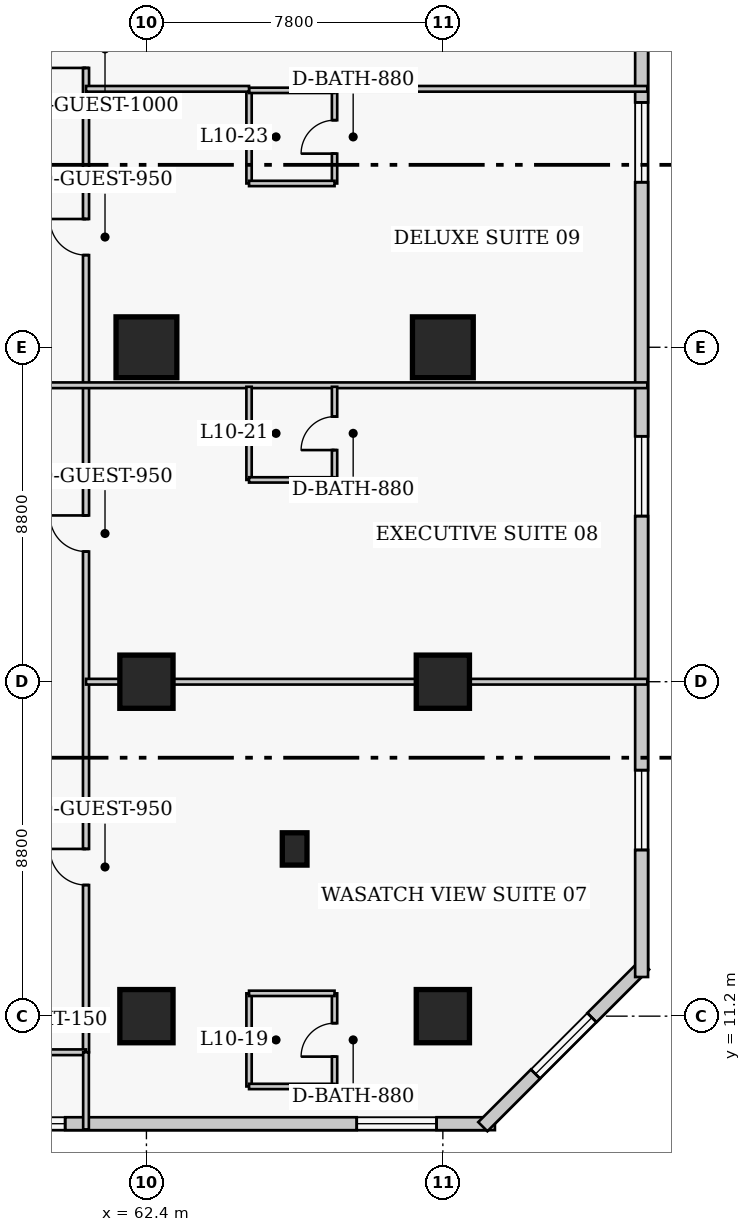
"""IFC4 building model, lengths in metres.
Left out: names, types, materials, properties, quantities, classifications, styles, units other than length and angle.
Written with IfcOpenShell. Run it as: python <this file> out.ifc"""

import sys

from ifc_helpers import new_model, si_unit, direction, frame, frame_2d, origin, origin_2d, place, context, subcontext, project, spatial, rectangle, extrude, element, fill, save


model = new_model("IFC4")
c1 = context("Model", 3, precision=1e-05, world=origin(), true_north=direction((0.0, 1.0)))
c2 = subcontext(c1, "Body", "Model", "MODEL_VIEW")
j1 = project(units=[si_unit("LENGTHUNIT", "METRE"), si_unit("PLANEANGLEUNIT", "RADIAN")], contexts=[c1])
p1 = place(None, origin())
s1 = spatial("IfcSite", under=j1, at=p1, CompositionType="ELEMENT")
p2 = place(p1, origin())
s2 = spatial("IfcBuilding", under=s1, at=p2, CompositionType="ELEMENT")
p3 = place(p2, frame((0.0, 0.0, 45.0)))
s3 = spatial("IfcBuildingStorey", under=s2, at=p3, CompositionType="ELEMENT", Elevation=45.0)
for number, where, z_axis, x_axis in (
    (1, (62.4, 11.2, 0.0), (0.0, 0.0, 1.0), (1.0, 0.0, 0.0)),
    (2, (62.4, 20.0, 0.0), (0.0, 0.0, 1.0), (1.0, 0.0, 0.0)),
):
    element("IfcColumn", number, at=place(p3, frame(where, z_axis=z_axis, x_axis=x_axis)), inside=s3, PredefinedType="COLUMN", context=c2, shape_type="SweptSolid", body=[
        extrude(rectangle(XDim=1.4, YDim=1.4, at=origin_2d()), origin(), (0.0, 0.0, 1.0), 3.8),
    ])
p4 = place(p3, frame((62.4, 28.8, 0.0), z_axis=(0.0, 0.0, 1.0), x_axis=(1.0, 0.0, 0.0)))
e3 = element("IfcColumn", 3, at=p4, inside=s3, PredefinedType="COLUMN", context=c2, shape_type="SweptSolid", body=[
    extrude(rectangle(XDim=1.6, YDim=1.6, at=origin_2d()), origin(), (0.0, 0.0, 1.0), 3.8),
])
for number, where, z_axis, x_axis in (
    (4, (70.2, 11.2, 0.0), (0.0, 0.0, 1.0), (1.0, 0.0, 0.0)),
    (5, (70.2, 20.0, 0.0), (0.0, 0.0, 1.0), (1.0, 0.0, 0.0)),
):
    element("IfcColumn", number, at=place(p3, frame(where, z_axis=z_axis, x_axis=x_axis)), inside=s3, PredefinedType="COLUMN", context=c2, shape_type="SweptSolid", body=[
        extrude(rectangle(XDim=1.4, YDim=1.4, at=origin_2d()), origin(), (0.0, 0.0, 1.0), 3.8),
    ])
p5 = place(p3, frame((70.2, 28.8, 0.0), z_axis=(0.0, 0.0, 1.0), x_axis=(1.0, 0.0, 0.0)))
e6 = element("IfcColumn", 6, at=p5, inside=s3, PredefinedType="COLUMN", context=c2, shape_type="SweptSolid", body=[
    extrude(rectangle(XDim=1.6, YDim=1.6, at=origin_2d()), origin(), (0.0, 0.0, 1.0), 3.8),
])
p6 = place(p3, frame((66.3, 15.6, 0.0), z_axis=(0.0, 0.0, 1.0), x_axis=(1.0, 0.0, 0.0)))
e7 = element("IfcColumn", 7, at=p6, inside=s3, PredefinedType="PILASTER", context=c2, shape_type="SweptSolid", body=[
    extrude(rectangle(XDim=0.65, YDim=0.85, at=origin_2d()), origin(), (0.0, 0.0, 1.0), 3.8),
])
p7 = place(p3, frame((41.68, 8.37, 0.0), z_axis=(0.0, 0.0, 1.0), x_axis=(1.0, 0.0, 0.0)))
e8 = element("IfcWall", 8, at=p7, inside=s3, PredefinedType="SOLIDWALL", context=c2, shape_type="SweptSolid", body=[
    extrude(rectangle(XDim=29.89, YDim=0.34, at=frame_2d((14.945, 0.0))), origin(), (0.0, 0.0, 1.0), 3.54),
])
p8 = place(p7, frame((2.036, 0.0, 0.85)))
e9 = element("IfcOpeningElement", 9, at=p8, cuts=e8, PredefinedType="OPENING", context=c2, shape_type="SweptSolid", body=[
    extrude(rectangle(XDim=2.1, YDim=1.85, at=frame_2d((1.05, 0.925))), frame((0.0, 0.18, 0.0), z_axis=(0.0, -1.0, 0.0), x_axis=(1.0, 0.0, 0.0)), (0.0, 0.0, 1.0), 0.36),
])
p9 = place(p7, frame((9.509, 0.0, 0.85)))
e10 = element("IfcOpeningElement", 10, at=p9, cuts=e8, PredefinedType="OPENING", context=c2, shape_type="SweptSolid", body=[
    extrude(rectangle(XDim=2.1, YDim=1.85, at=frame_2d((1.05, 0.925))), frame((0.0, 0.18, 0.0), z_axis=(0.0, -1.0, 0.0), x_axis=(1.0, 0.0, 0.0)), (0.0, 0.0, 1.0), 0.36),
])
p10 = place(p7, frame((16.481, 0.0, 0.85)))
e11 = element("IfcOpeningElement", 11, at=p10, cuts=e8, PredefinedType="OPENING", context=c2, shape_type="SweptSolid", body=[
    extrude(rectangle(XDim=2.1, YDim=1.85, at=frame_2d((1.05, 0.925))), frame((0.0, 0.18, 0.0), z_axis=(0.0, -1.0, 0.0), x_axis=(1.0, 0.0, 0.0)), (0.0, 0.0, 1.0), 0.36),
])
p11 = place(p7, frame((26.254, 0.0, 0.85)))
e12 = element("IfcOpeningElement", 12, at=p11, cuts=e8, PredefinedType="OPENING", context=c2, shape_type="SweptSolid", body=[
    extrude(rectangle(XDim=2.1, YDim=1.85, at=frame_2d((1.05, 0.925))), frame((0.0, 0.18, 0.0), z_axis=(0.0, -1.0, 0.0), x_axis=(1.0, 0.0, 0.0)), (0.0, 0.0, 1.0), 0.36),
])
p12 = place(p3, frame((71.251, 8.292, 0.0), z_axis=(0.0, 0.0, 1.0), x_axis=(0.707106781187, 0.707106781187, 0.0)))
e13 = element("IfcWall", 13, at=p12, inside=s3, PredefinedType="SOLIDWALL", context=c2, shape_type="SweptSolid", body=[
    extrude(rectangle(XDim=6.02, YDim=0.34, at=frame_2d((3.01, 0.0))), origin(), (0.0, 0.0, 1.0), 3.54),
])
p13 = place(p12, frame((1.96, 0.0, 0.85)))
e14 = element("IfcOpeningElement", 14, at=p13, cuts=e13, PredefinedType="OPENING", context=c2, shape_type="SweptSolid", body=[
    extrude(rectangle(XDim=2.1, YDim=1.85, at=frame_2d((1.05, 0.925))), frame((0.0, 0.18, 0.0), z_axis=(0.0, -1.0, 0.0), x_axis=(1.0, 0.0, 0.0)), (0.0, 0.0, 1.0), 0.36),
])
p14 = place(p3, frame((75.43, 12.23, 0.0), z_axis=(0.0, 0.0, 1.0), x_axis=(0.0, 1.0, 0.0)))
e15 = element("IfcWall", 15, at=p14, inside=s3, PredefinedType="SOLIDWALL", context=c2, shape_type="SweptSolid", body=[
    extrude(rectangle(XDim=35.14, YDim=0.34, at=frame_2d((17.57, 0.0))), origin(), (0.0, 0.0, 1.0), 3.54),
])
p15 = place(p14, frame((3.343, 0.0, 0.85)))
e16 = element("IfcOpeningElement", 16, at=p15, cuts=e15, PredefinedType="OPENING", context=c2, shape_type="SweptSolid", body=[
    extrude(rectangle(XDim=2.1, YDim=1.85, at=frame_2d((1.05, 0.925))), frame((0.0, 0.18, 0.0), z_axis=(0.0, -1.0, 0.0), x_axis=(1.0, 0.0, 0.0)), (0.0, 0.0, 1.0), 0.36),
])
p16 = place(p14, frame((12.127, 0.0, 0.85)))
e17 = element("IfcOpeningElement", 17, at=p16, cuts=e15, PredefinedType="OPENING", context=c2, shape_type="SweptSolid", body=[
    extrude(rectangle(XDim=2.1, YDim=1.85, at=frame_2d((1.05, 0.925))), frame((0.0, 0.18, 0.0), z_axis=(0.0, -1.0, 0.0), x_axis=(1.0, 0.0, 0.0)), (0.0, 0.0, 1.0), 0.36),
])
p17 = place(p14, frame((20.913, 0.0, 0.85)))
e18 = element("IfcOpeningElement", 18, at=p17, cuts=e15, PredefinedType="OPENING", context=c2, shape_type="SweptSolid", body=[
    extrude(rectangle(XDim=2.1, YDim=1.85, at=frame_2d((1.05, 0.925))), frame((0.0, 0.18, 0.0), z_axis=(0.0, -1.0, 0.0), x_axis=(1.0, 0.0, 0.0)), (0.0, 0.0, 1.0), 0.36),
])
p18 = place(p14, frame((29.698, 0.0, 0.85)))
e19 = element("IfcOpeningElement", 19, at=p18, cuts=e15, PredefinedType="OPENING", context=c2, shape_type="SweptSolid", body=[
    extrude(rectangle(XDim=2.1, YDim=1.85, at=frame_2d((1.05, 0.925))), frame((0.0, 0.18, 0.0), z_axis=(0.0, -1.0, 0.0), x_axis=(1.0, 0.0, 0.0)), (0.0, 0.0, 1.0), 0.36),
])
p19 = place(p3, frame((60.81, 10.25, 0.0), z_axis=(0.0, 0.0, 1.0), x_axis=(0.0, 1.0, 0.0)))
e20 = element("IfcWall", 20, at=p19, inside=s3, PredefinedType="PARTITIONING", context=c2, shape_type="SweptSolid", body=[
    extrude(rectangle(XDim=30.4, YDim=0.16, at=frame_2d((15.2, 0.0))), origin(), (0.0, 0.0, 1.0), 3.54),
])
p20 = place(p19, frame((4.4, 0.0, 0.0)))
e21 = element("IfcOpeningElement", 21, at=p20, cuts=e20, PredefinedType="OPENING", context=c2, shape_type="SweptSolid", body=[
    extrude(rectangle(XDim=0.95, YDim=2.1, at=frame_2d((0.475, 1.05))), frame((0.0, 0.09, 0.0), z_axis=(0.0, -1.0, 0.0), x_axis=(1.0, 0.0, 0.0)), (0.0, 0.0, 1.0), 0.18),
])
p21 = place(p19, frame((13.175, 0.0, 0.0)))
e22 = element("IfcOpeningElement", 22, at=p21, cuts=e20, PredefinedType="OPENING", context=c2, shape_type="SweptSolid", body=[
    extrude(rectangle(XDim=0.95, YDim=2.1, at=frame_2d((0.475, 1.05))), frame((0.0, 0.09, 0.0), z_axis=(0.0, -1.0, 0.0), x_axis=(1.0, 0.0, 0.0)), (0.0, 0.0, 1.0), 0.18),
])
p22 = place(p19, frame((20.975, 0.0, 0.0)))
e23 = element("IfcOpeningElement", 23, at=p22, cuts=e20, PredefinedType="OPENING", context=c2, shape_type="SweptSolid", body=[
    extrude(rectangle(XDim=0.95, YDim=2.1, at=frame_2d((0.475, 1.05))), frame((0.0, 0.09, 0.0), z_axis=(0.0, -1.0, 0.0), x_axis=(1.0, 0.0, 0.0)), (0.0, 0.0, 1.0), 0.18),
])
p23 = place(p19, frame((25.9, 0.0, 0.0)))
e24 = element("IfcOpeningElement", 24, at=p23, cuts=e20, PredefinedType="OPENING", context=c2, shape_type="SweptSolid", body=[
    extrude(rectangle(XDim=1.0, YDim=2.15, at=frame_2d((0.5, 1.075))), frame((0.0, 0.09, 0.0), z_axis=(0.0, -1.0, 0.0), x_axis=(1.0, 0.0, 0.0)), (0.0, 0.0, 1.0), 0.18),
])
p24 = place(p3, frame((58.59, 10.25, 0.0), z_axis=(0.0, 0.0, 1.0), x_axis=(1.0, 0.0, 0.0)))
e25 = element("IfcWall", 25, at=p24, inside=s3, PredefinedType="PARTITIONING", context=c2, shape_type="SweptSolid", body=[
    extrude(rectangle(XDim=2.22, YDim=0.15, at=frame_2d((1.11, 0.0))), origin(), (0.0, 0.0, 1.0), 3.54),
])
p25 = place(p3, frame((60.81, 8.22, 0.0), z_axis=(0.0, 0.0, 1.0), x_axis=(0.0, 1.0, 0.0)))
e26 = element("IfcWall", 26, at=p25, inside=s3, PredefinedType="PARTITIONING", context=c2, shape_type="SweptSolid", body=[
    extrude(rectangle(XDim=2.03, YDim=0.15, at=frame_2d((1.015, 0.0))), origin(), (0.0, 0.0, 1.0), 3.54),
])
p26 = place(p3, frame((65.1, 9.35, 0.0), z_axis=(0.0, 0.0, 1.0), x_axis=(0.0, 1.0, 0.0)))
e27 = element("IfcWall", 27, at=p26, inside=s3, PredefinedType="PLUMBINGWALL", context=c2, shape_type="SweptSolid", body=[
    extrude(rectangle(XDim=2.45, YDim=0.14, at=frame_2d((1.225, 0.0))), origin(), (0.0, 0.0, 1.0), 3.54),
])
p27 = place(p3, frame((67.35, 9.35, 0.0), z_axis=(0.0, 0.0, 1.0), x_axis=(0.0, 1.0, 0.0)))
e28 = element("IfcWall", 28, at=p27, inside=s3, PredefinedType="PLUMBINGWALL", context=c2, shape_type="SweptSolid", body=[
    extrude(rectangle(XDim=2.45, YDim=0.14, at=frame_2d((1.225, 0.0))), origin(), (0.0, 0.0, 1.0), 3.54),
])
p28 = place(p27, frame((0.785, 0.0, 0.0)))
e29 = element("IfcOpeningElement", 29, at=p28, cuts=e28, PredefinedType="OPENING", context=c2, shape_type="SweptSolid", body=[
    extrude(rectangle(XDim=0.88, YDim=2.05, at=frame_2d((0.44, 1.025))), frame((0.0, 0.08, 0.0), z_axis=(0.0, -1.0, 0.0), x_axis=(1.0, 0.0, 0.0)), (0.0, 0.0, 1.0), 0.16),
])
for number, where, z_axis, x_axis in (
    (30, (65.1, 9.35, 0.0), (0.0, 0.0, 1.0), (1.0, 0.0, 0.0)),
    (31, (65.1, 11.8, 0.0), (0.0, 0.0, 1.0), (1.0, 0.0, 0.0)),
):
    element("IfcWall", number, at=place(p3, frame(where, z_axis=z_axis, x_axis=x_axis)), inside=s3, PredefinedType="PLUMBINGWALL", context=c2, shape_type="SweptSolid", body=[
        extrude(rectangle(XDim=2.25, YDim=0.14, at=frame_2d((1.125, 0.0))), origin(), (0.0, 0.0, 1.0), 3.54),
    ])
p29 = place(p3, frame((60.81, 20.0, 0.0), z_axis=(0.0, 0.0, 1.0), x_axis=(1.0, 0.0, 0.0)))
e32 = element("IfcWall", 32, at=p29, inside=s3, PredefinedType="PARTITIONING", context=c2, shape_type="SweptSolid", body=[
    extrude(rectangle(XDim=14.77, YDim=0.15, at=frame_2d((7.385, 0.0))), origin(), (0.0, 0.0, 1.0), 2.593),
])
p30 = place(p3, frame((58.86, 27.8, 0.0), z_axis=(0.0, 0.0, 1.0), x_axis=(1.0, 0.0, 0.0)))
e33 = element("IfcWall", 33, at=p30, inside=s3, PredefinedType="PARTITIONING", context=c2, shape_type="SweptSolid", body=[
    extrude(rectangle(XDim=16.72, YDim=0.15, at=frame_2d((8.36, 0.0))), origin(), (0.0, 0.0, 1.0), 3.54),
])
p31 = place(p3, frame((65.1, 25.31, 0.0), z_axis=(0.0, 0.0, 1.0), x_axis=(0.0, 1.0, 0.0)))
e34 = element("IfcWall", 34, at=p31, inside=s3, PredefinedType="PLUMBINGWALL", context=c2, shape_type="SweptSolid", body=[
    extrude(rectangle(XDim=2.45, YDim=0.14, at=frame_2d((1.225, 0.0))), origin(), (0.0, 0.0, 1.0), 3.54),
])
p32 = place(p3, frame((67.35, 25.31, 0.0), z_axis=(0.0, 0.0, 1.0), x_axis=(0.0, 1.0, 0.0)))
e35 = element("IfcWall", 35, at=p32, inside=s3, PredefinedType="PLUMBINGWALL", context=c2, shape_type="SweptSolid", body=[
    extrude(rectangle(XDim=2.45, YDim=0.14, at=frame_2d((1.225, 0.0))), origin(), (0.0, 0.0, 1.0), 3.54),
])
p33 = place(p32, frame((0.785, 0.0, 0.0)))
e36 = element("IfcOpeningElement", 36, at=p33, cuts=e35, PredefinedType="OPENING", context=c2, shape_type="SweptSolid", body=[
    extrude(rectangle(XDim=0.88, YDim=2.05, at=frame_2d((0.44, 1.025))), frame((0.0, 0.08, 0.0), z_axis=(0.0, -1.0, 0.0), x_axis=(1.0, 0.0, 0.0)), (0.0, 0.0, 1.0), 0.16),
])
p34 = place(p3, frame((65.1, 25.31, 0.0), z_axis=(0.0, 0.0, 1.0), x_axis=(1.0, 0.0, 0.0)))
e37 = element("IfcWall", 37, at=p34, inside=s3, PredefinedType="PLUMBINGWALL", context=c2, shape_type="SweptSolid", body=[
    extrude(rectangle(XDim=2.25, YDim=0.14, at=frame_2d((1.125, 0.0))), origin(), (0.0, 0.0, 1.0), 3.54),
])
p35 = place(p3, frame((65.1, 33.11, 0.0), z_axis=(0.0, 0.0, 1.0), x_axis=(0.0, 1.0, 0.0)))
e38 = element("IfcWall", 38, at=p35, inside=s3, PredefinedType="PLUMBINGWALL", context=c2, shape_type="SweptSolid", body=[
    extrude(rectangle(XDim=2.45, YDim=0.14, at=frame_2d((1.225, 0.0))), origin(), (0.0, 0.0, 1.0), 3.54),
])
p36 = place(p3, frame((67.35, 33.11, 0.0), z_axis=(0.0, 0.0, 1.0), x_axis=(0.0, 1.0, 0.0)))
e39 = element("IfcWall", 39, at=p36, inside=s3, PredefinedType="PLUMBINGWALL", context=c2, shape_type="SweptSolid", body=[
    extrude(rectangle(XDim=2.45, YDim=0.14, at=frame_2d((1.225, 0.0))), origin(), (0.0, 0.0, 1.0), 3.54),
])
p37 = place(p36, frame((0.785, 0.0, 0.0)))
e40 = element("IfcOpeningElement", 40, at=p37, cuts=e39, PredefinedType="OPENING", context=c2, shape_type="SweptSolid", body=[
    extrude(rectangle(XDim=0.88, YDim=2.05, at=frame_2d((0.44, 1.025))), frame((0.0, 0.08, 0.0), z_axis=(0.0, -1.0, 0.0), x_axis=(1.0, 0.0, 0.0)), (0.0, 0.0, 1.0), 0.16),
])
for number, where, z_axis, x_axis in (
    (41, (65.1, 33.11, 0.0), (0.0, 0.0, 1.0), (1.0, 0.0, 0.0)),
    (42, (65.1, 35.56, 0.0), (0.0, 0.0, 1.0), (1.0, 0.0, 0.0)),
):
    element("IfcWall", number, at=place(p3, frame(where, z_axis=z_axis, x_axis=x_axis)), inside=s3, PredefinedType="PLUMBINGWALL", context=c2, shape_type="SweptSolid", body=[
        extrude(rectangle(XDim=2.25, YDim=0.14, at=frame_2d((1.125, 0.0))), origin(), (0.0, 0.0, 1.0), 3.54),
    ])
p38 = place(p3, frame((60.81, 35.6, 0.0), z_axis=(0.0, 0.0, 1.0), x_axis=(1.0, 0.0, 0.0)))
e43 = element("IfcWall", 43, at=p38, inside=s3, PredefinedType="PARTITIONING", context=c2, shape_type="SweptSolid", body=[
    extrude(rectangle(XDim=4.29, YDim=0.15, at=frame_2d((2.145, 0.0))), origin(), (0.0, 0.0, 1.0), 3.54),
])
p39 = place(p3, frame((67.35, 35.6, 0.0), z_axis=(0.0, 0.0, 1.0), x_axis=(1.0, 0.0, 0.0)))
e44 = element("IfcWall", 44, at=p39, inside=s3, PredefinedType="PARTITIONING", context=c2, shape_type="SweptSolid", body=[
    extrude(rectangle(XDim=8.23, YDim=0.15, at=frame_2d((4.115, 0.0))), origin(), (0.0, 0.0, 1.0), 3.54),
])
p40 = place(p10, origin())
e45 = element("IfcWindow", 45, at=p40, inside=s3, PartitioningType="SINGLE_PANEL", PredefinedType="WINDOW", context=c2, shape_type="SweptSolid", body=[
    extrude(rectangle(XDim=2.1, YDim=1.85, at=frame_2d((1.05, 0.925))), frame((0.0, 0.03, 0.0), z_axis=(0.0, -1.0, 0.0), x_axis=(1.0, 0.0, 0.0)), (0.0, 0.0, 1.0), 0.06),
])
fill(e11, e45)
p41 = place(p11, origin())
e46 = element("IfcWindow", 46, at=p41, inside=s3, PartitioningType="SINGLE_PANEL", PredefinedType="WINDOW", context=c2, shape_type="SweptSolid", body=[
    extrude(rectangle(XDim=2.1, YDim=1.85, at=frame_2d((1.05, 0.925))), frame((0.0, 0.03, 0.0), z_axis=(0.0, -1.0, 0.0), x_axis=(1.0, 0.0, 0.0)), (0.0, 0.0, 1.0), 0.06),
])
fill(e12, e46)
p42 = place(p13, origin())
e47 = element("IfcWindow", 47, at=p42, inside=s3, PartitioningType="SINGLE_PANEL", PredefinedType="WINDOW", context=c2, shape_type="SweptSolid", body=[
    extrude(rectangle(XDim=2.1, YDim=1.85, at=frame_2d((1.05, 0.925))), frame((0.0, 0.03, 0.0), z_axis=(0.0, -1.0, 0.0), x_axis=(1.0, 0.0, 0.0)), (0.0, 0.0, 1.0), 0.06),
])
fill(e14, e47)
p43 = place(p15, origin())
e48 = element("IfcWindow", 48, at=p43, inside=s3, PartitioningType="SINGLE_PANEL", PredefinedType="WINDOW", context=c2, shape_type="SweptSolid", body=[
    extrude(rectangle(XDim=2.1, YDim=1.85, at=frame_2d((1.05, 0.925))), frame((0.0, 0.03, 0.0), z_axis=(0.0, -1.0, 0.0), x_axis=(1.0, 0.0, 0.0)), (0.0, 0.0, 1.0), 0.06),
])
fill(e16, e48)
p44 = place(p16, origin())
e49 = element("IfcWindow", 49, at=p44, inside=s3, PartitioningType="SINGLE_PANEL", PredefinedType="WINDOW", context=c2, shape_type="SweptSolid", body=[
    extrude(rectangle(XDim=2.1, YDim=1.85, at=frame_2d((1.05, 0.925))), frame((0.0, 0.03, 0.0), z_axis=(0.0, -1.0, 0.0), x_axis=(1.0, 0.0, 0.0)), (0.0, 0.0, 1.0), 0.06),
])
fill(e17, e49)
p45 = place(p17, origin())
e50 = element("IfcWindow", 50, at=p45, inside=s3, PartitioningType="SINGLE_PANEL", PredefinedType="WINDOW", context=c2, shape_type="SweptSolid", body=[
    extrude(rectangle(XDim=2.1, YDim=1.85, at=frame_2d((1.05, 0.925))), frame((0.0, 0.03, 0.0), z_axis=(0.0, -1.0, 0.0), x_axis=(1.0, 0.0, 0.0)), (0.0, 0.0, 1.0), 0.06),
])
fill(e18, e50)
p46 = place(p28, origin())
e51 = element("IfcDoor", 51, at=p46, inside=s3, OperationType="SINGLE_SWING_LEFT", PredefinedType="DOOR", context=c2, shape_type="SweptSolid", body=[
    extrude(rectangle(XDim=0.88, YDim=2.05, at=frame_2d((0.44, 1.025))), frame((0.0, 0.025, 0.0), z_axis=(0.0, -1.0, 0.0), x_axis=(1.0, 0.0, 0.0)), (0.0, 0.0, 1.0), 0.05),
])
fill(e29, e51)
p47 = place(p20, origin())
e52 = element("IfcDoor", 52, at=p47, inside=s3, OperationType="SINGLE_SWING_RIGHT", PredefinedType="DOOR", context=c2, shape_type="SweptSolid", body=[
    extrude(rectangle(XDim=0.95, YDim=2.1, at=frame_2d((0.475, 1.05))), frame((0.0, 0.025, 0.0), z_axis=(0.0, -1.0, 0.0), x_axis=(1.0, 0.0, 0.0)), (0.0, 0.0, 1.0), 0.05),
])
fill(e21, e52)
p48 = place(p33, origin())
e53 = element("IfcDoor", 53, at=p48, inside=s3, OperationType="SINGLE_SWING_LEFT", PredefinedType="DOOR", context=c2, shape_type="SweptSolid", body=[
    extrude(rectangle(XDim=0.88, YDim=2.05, at=frame_2d((0.44, 1.025))), frame((0.0, 0.025, 0.0), z_axis=(0.0, -1.0, 0.0), x_axis=(1.0, 0.0, 0.0)), (0.0, 0.0, 1.0), 0.05),
])
fill(e36, e53)
p49 = place(p21, origin())
e54 = element("IfcDoor", 54, at=p49, inside=s3, OperationType="SINGLE_SWING_RIGHT", PredefinedType="DOOR", context=c2, shape_type="SweptSolid", body=[
    extrude(rectangle(XDim=0.95, YDim=2.1, at=frame_2d((0.475, 1.05))), frame((0.0, 0.025, 0.0), z_axis=(0.0, -1.0, 0.0), x_axis=(1.0, 0.0, 0.0)), (0.0, 0.0, 1.0), 0.05),
])
fill(e22, e54)
p50 = place(p37, origin())
e55 = element("IfcDoor", 55, at=p50, inside=s3, OperationType="SINGLE_SWING_LEFT", PredefinedType="DOOR", context=c2, shape_type="SweptSolid", body=[
    extrude(rectangle(XDim=0.88, YDim=2.05, at=frame_2d((0.44, 1.025))), frame((0.0, 0.025, 0.0), z_axis=(0.0, -1.0, 0.0), x_axis=(1.0, 0.0, 0.0)), (0.0, 0.0, 1.0), 0.05),
])
fill(e40, e55)
p51 = place(p22, origin())
e56 = element("IfcDoor", 56, at=p51, inside=s3, OperationType="SINGLE_SWING_RIGHT", PredefinedType="DOOR", context=c2, shape_type="SweptSolid", body=[
    extrude(rectangle(XDim=0.95, YDim=2.1, at=frame_2d((0.475, 1.05))), frame((0.0, 0.025, 0.0), z_axis=(0.0, -1.0, 0.0), x_axis=(1.0, 0.0, 0.0)), (0.0, 0.0, 1.0), 0.05),
])
fill(e23, e56)
p52 = place(p23, origin())
e57 = element("IfcDoor", 57, at=p52, inside=s3, OperationType="SINGLE_SWING_LEFT", PredefinedType="DOOR", context=c2, shape_type="SweptSolid", body=[
    extrude(rectangle(XDim=1.0, YDim=2.15, at=frame_2d((0.5, 1.075))), frame((0.0, 0.025, 0.0), z_axis=(0.0, -1.0, 0.0), x_axis=(1.0, 0.0, 0.0)), (0.0, 0.0, 1.0), 0.05),
])
fill(e24, e57)
save(model, sys.argv[1])
